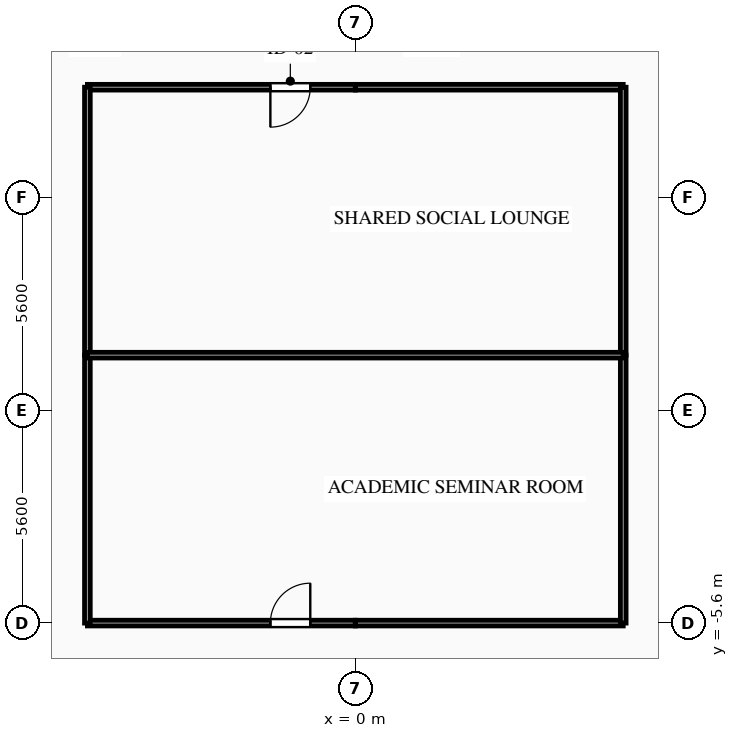
"""IFC4 building model, lengths in metres.
Left out: names, types, materials, properties, quantities, classifications, styles, units other than length and angle.
Written with IfcOpenShell. Run it as: python <this file> out.ifc"""

import sys

from ifc_helpers import new_model, si_unit, direction, frame, frame_2d, origin, place, context, subcontext, project, spatial, rectangle, extrude, element, fill, save


model = new_model("IFC4")
c1 = context("Model", 3, precision=1e-05, world=origin(), true_north=direction((0.0, 1.0)))
c2 = subcontext(c1, "Body", "Model", "MODEL_VIEW")
j1 = project(units=[si_unit("LENGTHUNIT", "METRE"), si_unit("PLANEANGLEUNIT", "RADIAN")], contexts=[c1])
p1 = place(None, origin())
s1 = spatial("IfcSite", under=j1, at=p1, CompositionType="ELEMENT")
p2 = place(p1, origin())
s2 = spatial("IfcBuilding", under=s1, at=p2, CompositionType="ELEMENT")
p3 = place(p2, frame((0.0, 0.0, 37.05)))
s3 = spatial("IfcBuildingStorey", under=s2, at=p3, CompositionType="ELEMENT", Elevation=37.05)
p4 = place(p3, frame((0.0, 8.5, 0.0), z_axis=(0.0, 0.0, 1.0), x_axis=(-1.0, 0.0, 0.0)))
e1 = element("IfcWall", 1, at=p4, inside=s3, PredefinedType="PARTITIONING", context=c2, shape_type="SweptSolid", body=[
    extrude(rectangle(XDim=7.05, YDim=0.15, at=frame_2d((3.525, 0.0))), origin(), (0.0, 0.0, 1.0), 3.035),
])
p5 = place(p4, frame((1.185, 0.0, 0.0)))
e2 = element("IfcOpeningElement", 2, at=p5, cuts=e1, PredefinedType="OPENING", context=c2, shape_type="SweptSolid", body=[
    extrude(rectangle(XDim=1.05, YDim=2.15, at=frame_2d((0.525, 1.075))), frame((0.0, 0.085, 0.0), z_axis=(0.0, -1.0, 0.0), x_axis=(1.0, 0.0, 0.0)), (0.0, 0.0, 1.0), 0.17),
])
p6 = place(p3, frame((7.05, 8.5, 0.0), z_axis=(0.0, 0.0, 1.0), x_axis=(-1.0, 0.0, 0.0)))
e3 = element("IfcWall", 3, at=p6, inside=s3, PredefinedType="PARTITIONING", context=c2, shape_type="SweptSolid", body=[
    extrude(rectangle(XDim=7.05, YDim=0.15, at=frame_2d((3.525, 0.0))), origin(), (0.0, 0.0, 1.0), 3.035),
])
p7 = place(p3, frame((-7.05, -5.6, 0.0), z_axis=(0.0, 0.0, 1.0), x_axis=(1.0, 0.0, 0.0)))
e4 = element("IfcWall", 4, at=p7, inside=s3, PredefinedType="PARTITIONING", context=c2, shape_type="SweptSolid", body=[
    extrude(rectangle(XDim=7.05, YDim=0.15, at=frame_2d((3.525, 0.0))), origin(), (0.0, 0.0, 1.0), 2.52),
])
p8 = place(p7, frame((4.815, 0.0, 0.0)))
e5 = element("IfcOpeningElement", 5, at=p8, cuts=e4, PredefinedType="OPENING", context=c2, shape_type="SweptSolid", body=[
    extrude(rectangle(XDim=1.05, YDim=2.15, at=frame_2d((0.525, 1.075))), frame((0.0, 0.085, 0.0), z_axis=(0.0, -1.0, 0.0), x_axis=(1.0, 0.0, 0.0)), (0.0, 0.0, 1.0), 0.17),
])
p9 = place(p3, frame((0.0, -5.6, 0.0), z_axis=(0.0, 0.0, 1.0), x_axis=(1.0, 0.0, 0.0)))
e6 = element("IfcWall", 6, at=p9, inside=s3, PredefinedType="PARTITIONING", context=c2, shape_type="SweptSolid", body=[
    extrude(rectangle(XDim=7.05, YDim=0.15, at=frame_2d((3.525, 0.0))), origin(), (0.0, 0.0, 1.0), 2.52),
])
for number, where, z_axis, x_axis in (
    (7, (-7.05, 1.45, 0.0), (0.0, 0.0, 1.0), (0.0, -1.0, 0.0)),
    (8, (-7.05, 8.5, 0.0), (0.0, 0.0, 1.0), (0.0, -1.0, 0.0)),
    (9, (7.05, -5.6, 0.0), (0.0, 0.0, 1.0), (0.0, 1.0, 0.0)),
    (10, (7.05, 1.45, 0.0), (0.0, 0.0, 1.0), (0.0, 1.0, 0.0)),
):
    element("IfcWall", number, at=place(p3, frame(where, z_axis=z_axis, x_axis=x_axis)), inside=s3, PredefinedType="PARTITIONING", context=c2, shape_type="SweptSolid", body=[
        extrude(rectangle(XDim=7.05, YDim=0.15, at=frame_2d((3.525, 0.0))), origin(), (0.0, 0.0, 1.0), 3.035),
    ])
p10 = place(p3, frame((-7.05, 1.45, 0.0), z_axis=(0.0, 0.0, 1.0), x_axis=(1.0, 0.0, 0.0)))
e11 = element("IfcWall", 11, at=p10, inside=s3, PredefinedType="PARTITIONING", context=c2, shape_type="SweptSolid", body=[
    extrude(rectangle(XDim=14.1, YDim=0.15, at=frame_2d((7.05, 0.0))), origin(), (0.0, 0.0, 1.0), 3.035),
])
p11 = place(p5, origin())
e12 = element("IfcDoor", 12, at=p11, inside=s3, OperationType="SINGLE_SWING_RIGHT", PredefinedType="DOOR", context=c2, shape_type="SweptSolid", body=[
    extrude(rectangle(XDim=1.05, YDim=2.15, at=frame_2d((0.525, 1.075))), frame((0.0, 0.025, 0.0), z_axis=(0.0, -1.0, 0.0), x_axis=(1.0, 0.0, 0.0)), (0.0, 0.0, 1.0), 0.05),
])
fill(e2, e12)
p12 = place(p8, origin())
e13 = element("IfcDoor", 13, at=p12, inside=s3, OperationType="SINGLE_SWING_RIGHT", PredefinedType="DOOR", context=c2, shape_type="SweptSolid", body=[
    extrude(rectangle(XDim=1.05, YDim=2.15, at=frame_2d((0.525, 1.075))), frame((0.0, 0.025, 0.0), z_axis=(0.0, -1.0, 0.0), x_axis=(1.0, 0.0, 0.0)), (0.0, 0.0, 1.0), 0.05),
])
fill(e5, e13)
save(model, sys.argv[1])
